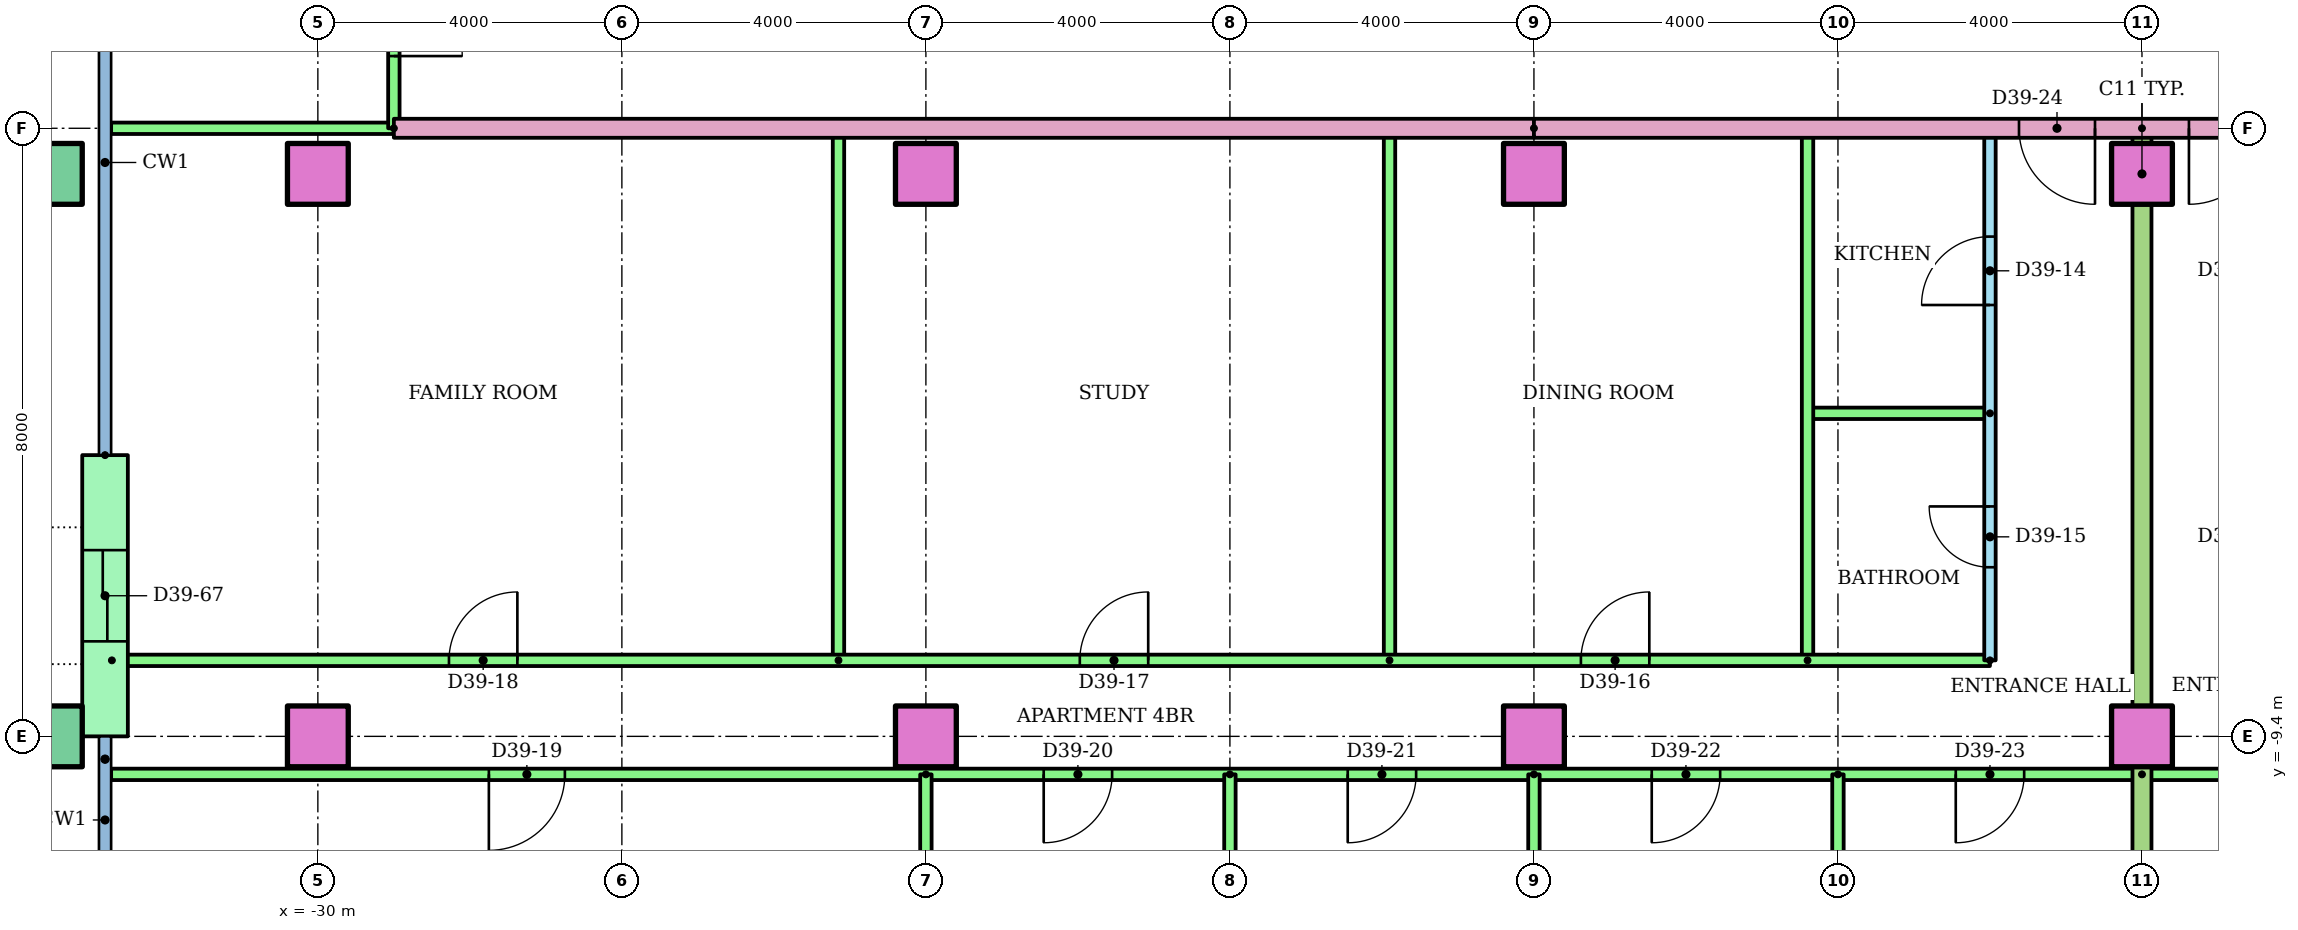
"""IFC4 building model, lengths in metres.
Left out: names, types, materials, properties, quantities, classifications, styles, units other than length and angle.
Written with IfcOpenShell. Run it as: python <this file> out.ifc"""

import sys

from ifc_helpers import new_model, si_unit, direction, frame, frame_2d, origin, origin_2d, place, context, subcontext, project, spatial, rectangle, hollow_rectangle, extrude, element, fill, save


model = new_model("IFC4")
c1 = context("Model", 3, precision=1e-05, world=origin(), true_north=direction((0.0, 1.0)))
c2 = subcontext(c1, "Body", "Model", "MODEL_VIEW")
j1 = project(units=[si_unit("LENGTHUNIT", "METRE"), si_unit("PLANEANGLEUNIT", "RADIAN")], contexts=[c1])
p1 = place(None, origin())
s1 = spatial("IfcSite", under=j1, at=p1, CompositionType="ELEMENT")
p2 = place(p1, origin())
s2 = spatial("IfcBuilding", under=s1, at=p2, CompositionType="ELEMENT")
p3 = place(p2, frame((0.0, 0.0, 148.6)))
s3 = spatial("IfcBuildingStorey", under=s2, at=p3, CompositionType="ELEMENT", Elevation=148.6)
p4 = place(p3, frame((-33.5, -9.4, 0.0)))
e1 = element("IfcColumn", 1, at=p4, inside=s3, PredefinedType="COLUMN", context=c2, shape_type="SweptSolid", body=[
    extrude(hollow_rectangle(XDim=0.8, YDim=0.8, WallThickness=0.04, at=origin_2d()), origin(), (0.0, 0.0, 1.0), 3.2),
])
for number, where in (
    (2, (-30.0, -9.4, 0.0)),
    (3, (-22.0, -9.4, 0.0)),
    (4, (-14.0, -9.4, 0.0)),
    (5, (-6.0, -9.4, 0.0)),
):
    element("IfcColumn", number, at=place(p3, frame(where)), inside=s3, PredefinedType="COLUMN", context=c2, shape_type="SweptSolid", body=[
        extrude(rectangle(XDim=0.8, YDim=0.8, at=origin_2d()), origin(), (0.0, 0.0, 1.0), 3.2),
    ])
p5 = place(p3, frame((-33.5, -2.0, 0.0)))
e6 = element("IfcColumn", 6, at=p5, inside=s3, PredefinedType="COLUMN", context=c2, shape_type="SweptSolid", body=[
    extrude(hollow_rectangle(XDim=0.8, YDim=0.8, WallThickness=0.04, at=origin_2d()), origin(), (0.0, 0.0, 1.0), 3.2),
])
for number, where in (
    (7, (-30.0, -2.0, 0.0)),
    (8, (-22.0, -2.0, 0.0)),
    (9, (-14.0, -2.0, 0.0)),
    (10, (-6.0, -2.0, 0.0)),
):
    element("IfcColumn", number, at=place(p3, frame(where)), inside=s3, PredefinedType="COLUMN", context=c2, shape_type="SweptSolid", body=[
        extrude(rectangle(XDim=0.8, YDim=0.8, at=origin_2d()), origin(), (0.0, 0.0, 1.0), 3.2),
    ])
p6 = place(p3, frame((-32.8, -5.7, 0.0), z_axis=(0.0, 0.0, 1.0), x_axis=(0.0, -1.0, 0.0)))
e11 = element("IfcWall", 11, at=p6, inside=s3, PredefinedType="STANDARD", context=c2, shape_type="SweptSolid", body=[
    extrude(rectangle(XDim=3.7, YDim=0.6, at=frame_2d((1.85, 0.0))), origin(), (0.0, 0.0, 1.0), 2.8),
])
p7 = place(p6, frame((1.25, 0.0, 0.0)))
e12 = element("IfcOpeningElement", 12, at=p7, cuts=e11, PredefinedType="OPENING", context=c2, shape_type="SweptSolid", body=[
    extrude(rectangle(XDim=1.2, YDim=2.1, at=frame_2d((0.6, 1.05))), frame((0.0, 0.31, 0.0), z_axis=(0.0, -1.0, 0.0), x_axis=(1.0, 0.0, 0.0)), (0.0, 0.0, 1.0), 0.62),
])
p8 = place(p3, frame((-8.0, -8.4, 0.0), z_axis=(0.0, 0.0, 1.0), x_axis=(0.0, 1.0, 0.0)))
e13 = element("IfcWall", 13, at=p8, inside=s3, PredefinedType="PARTITIONING", context=c2, shape_type="SweptSolid", body=[
    extrude(rectangle(XDim=7.0, YDim=0.15, at=frame_2d((3.5, 0.0))), origin(), (0.0, 0.0, 1.0), 2.4),
])
p9 = place(p8, frame((4.675, 0.0, 0.0)))
e14 = element("IfcOpeningElement", 14, at=p9, cuts=e13, PredefinedType="OPENING", context=c2, shape_type="SweptSolid", body=[
    extrude(rectangle(XDim=0.9, YDim=2.1, at=frame_2d((0.45, 1.05))), frame((0.0, 0.085, 0.0), z_axis=(0.0, -1.0, 0.0), x_axis=(1.0, 0.0, 0.0)), (0.0, 0.0, 1.0), 0.17),
])
p10 = place(p8, frame((1.225, 0.0, 0.0)))
e15 = element("IfcOpeningElement", 15, at=p10, cuts=e13, PredefinedType="OPENING", context=c2, shape_type="SweptSolid", body=[
    extrude(rectangle(XDim=0.8, YDim=2.1, at=frame_2d((0.4, 1.05))), frame((0.0, 0.085, 0.0), z_axis=(0.0, -1.0, 0.0), x_axis=(1.0, 0.0, 0.0)), (0.0, 0.0, 1.0), 0.17),
])
p11 = place(p3, frame((-8.0, -5.15, 0.0), z_axis=(0.0, 0.0, 1.0), x_axis=(-1.0, 0.0, 0.0)))
e16 = element("IfcWall", 16, at=p11, inside=s3, PredefinedType="PARTITIONING", context=c2, shape_type="SweptSolid", body=[
    extrude(rectangle(XDim=2.4, YDim=0.15, at=frame_2d((1.2, 0.0))), origin(), (0.0, 0.0, 1.0), 2.4),
])
for number, where, z_axis, x_axis in (
    (17, (-10.4, -8.4, 0.0), (0.0, 0.0, 1.0), (0.0, 1.0, 0.0)),
    (18, (-15.9, -8.4, 0.0), (0.0, 0.0, 1.0), (0.0, 1.0, 0.0)),
    (19, (-23.15, -8.4, 0.0), (0.0, 0.0, 1.0), (0.0, 1.0, 0.0)),
):
    element("IfcWall", number, at=place(p3, frame(where, z_axis=z_axis, x_axis=x_axis)), inside=s3, PredefinedType="PARTITIONING", context=c2, shape_type="SweptSolid", body=[
        extrude(rectangle(XDim=7.0, YDim=0.15, at=frame_2d((3.5, 0.0))), origin(), (0.0, 0.0, 1.0), 2.4),
    ])
p12 = place(p3, frame((-32.71, -8.4, 0.0)))
e20 = element("IfcWall", 20, at=p12, inside=s3, PredefinedType="PARTITIONING", context=c2, shape_type="SweptSolid", body=[
    extrude(rectangle(XDim=24.71, YDim=0.15, at=frame_2d((12.355, 0.0))), origin(), (0.0, 0.0, 1.0), 2.4),
])
p13 = place(p12, frame((19.328, 0.0, 0.0)))
e21 = element("IfcOpeningElement", 21, at=p13, cuts=e20, PredefinedType="OPENING", context=c2, shape_type="SweptSolid", body=[
    extrude(rectangle(XDim=0.9, YDim=2.1, at=frame_2d((0.45, 1.05))), frame((0.0, 0.085, 0.0), z_axis=(0.0, -1.0, 0.0), x_axis=(1.0, 0.0, 0.0)), (0.0, 0.0, 1.0), 0.17),
])
p14 = place(p12, frame((12.735, 0.0, 0.0)))
e22 = element("IfcOpeningElement", 22, at=p14, cuts=e20, PredefinedType="OPENING", context=c2, shape_type="SweptSolid", body=[
    extrude(rectangle(XDim=0.9, YDim=2.1, at=frame_2d((0.45, 1.05))), frame((0.0, 0.085, 0.0), z_axis=(0.0, -1.0, 0.0), x_axis=(1.0, 0.0, 0.0)), (0.0, 0.0, 1.0), 0.17),
])
p15 = place(p12, frame((4.435, 0.0, 0.0)))
e23 = element("IfcOpeningElement", 23, at=p15, cuts=e20, PredefinedType="OPENING", context=c2, shape_type="SweptSolid", body=[
    extrude(rectangle(XDim=0.9, YDim=2.1, at=frame_2d((0.45, 1.05))), frame((0.0, 0.085, 0.0), z_axis=(0.0, -1.0, 0.0), x_axis=(1.0, 0.0, 0.0)), (0.0, 0.0, 1.0), 0.17),
])
p16 = place(p3, frame((-6.0, -9.9, 0.0), z_axis=(0.0, 0.0, 1.0), x_axis=(-1.0, 0.0, 0.0)))
e24 = element("IfcWall", 24, at=p16, inside=s3, PredefinedType="PARTITIONING", context=c2, shape_type="SweptSolid", body=[
    extrude(rectangle(XDim=26.72, YDim=0.15, at=frame_2d((13.36, 0.0))), origin(), (0.0, 0.0, 1.0), 2.4),
])
p17 = place(p16, frame((20.75, 0.0, 0.0)))
e25 = element("IfcOpeningElement", 25, at=p17, cuts=e24, PredefinedType="OPENING", context=c2, shape_type="SweptSolid", body=[
    extrude(rectangle(XDim=1.0, YDim=2.1, at=frame_2d((0.5, 1.05))), frame((0.0, 0.085, 0.0), z_axis=(0.0, -1.0, 0.0), x_axis=(1.0, 0.0, 0.0)), (0.0, 0.0, 1.0), 0.17),
])
p18 = place(p16, frame((13.55, 0.0, 0.0)))
e26 = element("IfcOpeningElement", 26, at=p18, cuts=e24, PredefinedType="OPENING", context=c2, shape_type="SweptSolid", body=[
    extrude(rectangle(XDim=0.9, YDim=2.1, at=frame_2d((0.45, 1.05))), frame((0.0, 0.085, 0.0), z_axis=(0.0, -1.0, 0.0), x_axis=(1.0, 0.0, 0.0)), (0.0, 0.0, 1.0), 0.17),
])
p19 = place(p16, frame((9.55, 0.0, 0.0)))
e27 = element("IfcOpeningElement", 27, at=p19, cuts=e24, PredefinedType="OPENING", context=c2, shape_type="SweptSolid", body=[
    extrude(rectangle(XDim=0.9, YDim=2.1, at=frame_2d((0.45, 1.05))), frame((0.0, 0.085, 0.0), z_axis=(0.0, -1.0, 0.0), x_axis=(1.0, 0.0, 0.0)), (0.0, 0.0, 1.0), 0.17),
])
p20 = place(p16, frame((5.55, 0.0, 0.0)))
e28 = element("IfcOpeningElement", 28, at=p20, cuts=e24, PredefinedType="OPENING", context=c2, shape_type="SweptSolid", body=[
    extrude(rectangle(XDim=0.9, YDim=2.1, at=frame_2d((0.45, 1.05))), frame((0.0, 0.085, 0.0), z_axis=(0.0, -1.0, 0.0), x_axis=(1.0, 0.0, 0.0)), (0.0, 0.0, 1.0), 0.17),
])
p21 = place(p16, frame((1.55, 0.0, 0.0)))
e29 = element("IfcOpeningElement", 29, at=p21, cuts=e24, PredefinedType="OPENING", context=c2, shape_type="SweptSolid", body=[
    extrude(rectangle(XDim=0.9, YDim=2.1, at=frame_2d((0.45, 1.05))), frame((0.0, 0.085, 0.0), z_axis=(0.0, -1.0, 0.0), x_axis=(1.0, 0.0, 0.0)), (0.0, 0.0, 1.0), 0.17),
])
p22 = place(p3, frame((-22.0, -9.9, 0.0), z_axis=(0.0, 0.0, 1.0), x_axis=(0.0, -1.0, 0.0)))
e30 = element("IfcWall", 30, at=p22, inside=s3, PredefinedType="PARTITIONING", context=c2, shape_type="SweptSolid", body=[
    extrude(rectangle(XDim=6.41, YDim=0.15, at=frame_2d((3.205, 0.0))), origin(), (0.0, 0.0, 1.0), 2.4),
])
p23 = place(p3, frame((-18.0, -9.9, 0.0), z_axis=(0.0, 0.0, 1.0), x_axis=(0.0, -1.0, 0.0)))
e31 = element("IfcWall", 31, at=p23, inside=s3, PredefinedType="PARTITIONING", context=c2, shape_type="SweptSolid", body=[
    extrude(rectangle(XDim=6.421, YDim=0.15, at=frame_2d((3.21, 0.0))), origin(), (0.0, 0.0, 1.0), 2.4),
])
p24 = place(p3, frame((-14.0, -9.9, 0.0), z_axis=(0.0, 0.0, 1.0), x_axis=(0.0, -1.0, 0.0)))
e32 = element("IfcWall", 32, at=p24, inside=s3, PredefinedType="PARTITIONING", context=c2, shape_type="SweptSolid", body=[
    extrude(rectangle(XDim=6.41, YDim=0.15, at=frame_2d((3.205, 0.0))), origin(), (0.0, 0.0, 1.0), 2.4),
])
p25 = place(p3, frame((-10.0, -9.9, 0.0), z_axis=(0.0, 0.0, 1.0), x_axis=(0.0, -1.0, 0.0)))
e33 = element("IfcWall", 33, at=p25, inside=s3, PredefinedType="PARTITIONING", context=c2, shape_type="SweptSolid", body=[
    extrude(rectangle(XDim=6.421, YDim=0.15, at=frame_2d((3.21, 0.0))), origin(), (0.0, 0.0, 1.0), 2.4),
])
p26 = place(p3, frame((18.0, -9.9, 0.0), z_axis=(0.0, 0.0, 1.0), x_axis=(-1.0, 0.0, 0.0)))
e34 = element("IfcWall", 34, at=p26, inside=s3, PredefinedType="PARTITIONING", context=c2, shape_type="SweptSolid", body=[
    extrude(rectangle(XDim=24.0, YDim=0.15, at=frame_2d((12.0, 0.0))), origin(), (0.0, 0.0, 1.0), 2.4),
])
p27 = place(p26, frame((21.55, 0.0, 0.0)))
e35 = element("IfcOpeningElement", 35, at=p27, cuts=e34, PredefinedType="OPENING", context=c2, shape_type="SweptSolid", body=[
    extrude(rectangle(XDim=0.9, YDim=2.1, at=frame_2d((0.45, 1.05))), frame((0.0, 0.085, 0.0), z_axis=(0.0, -1.0, 0.0), x_axis=(1.0, 0.0, 0.0)), (0.0, 0.0, 1.0), 0.17),
])
p28 = place(p26, frame((17.55, 0.0, 0.0)))
e36 = element("IfcOpeningElement", 36, at=p28, cuts=e34, PredefinedType="OPENING", context=c2, shape_type="SweptSolid", body=[
    extrude(rectangle(XDim=0.9, YDim=2.1, at=frame_2d((0.45, 1.05))), frame((0.0, 0.085, 0.0), z_axis=(0.0, -1.0, 0.0), x_axis=(1.0, 0.0, 0.0)), (0.0, 0.0, 1.0), 0.17),
])
p29 = place(p26, frame((11.5, 0.0, 0.0)))
e37 = element("IfcOpeningElement", 37, at=p29, cuts=e34, PredefinedType="OPENING", context=c2, shape_type="SweptSolid", body=[
    extrude(rectangle(XDim=1.0, YDim=2.1, at=frame_2d((0.5, 1.05))), frame((0.0, 0.085, 0.0), z_axis=(0.0, -1.0, 0.0), x_axis=(1.0, 0.0, 0.0)), (0.0, 0.0, 1.0), 0.17),
])
p30 = place(p26, frame((5.55, 0.0, 0.0)))
e38 = element("IfcOpeningElement", 38, at=p30, cuts=e34, PredefinedType="OPENING", context=c2, shape_type="SweptSolid", body=[
    extrude(rectangle(XDim=0.9, YDim=2.1, at=frame_2d((0.45, 1.05))), frame((0.0, 0.085, 0.0), z_axis=(0.0, -1.0, 0.0), x_axis=(1.0, 0.0, 0.0)), (0.0, 0.0, 1.0), 0.17),
])
p31 = place(p26, frame((1.55, 0.0, 0.0)))
e39 = element("IfcOpeningElement", 39, at=p31, cuts=e34, PredefinedType="OPENING", context=c2, shape_type="SweptSolid", body=[
    extrude(rectangle(XDim=0.9, YDim=2.1, at=frame_2d((0.45, 1.05))), frame((0.0, 0.085, 0.0), z_axis=(0.0, -1.0, 0.0), x_axis=(1.0, 0.0, 0.0)), (0.0, 0.0, 1.0), 0.17),
])
p32 = place(p3, frame((-6.0, -1.4, 0.0), z_axis=(0.0, 0.0, 1.0), x_axis=(0.0, -1.0, 0.0)))
e40 = element("IfcWall", 40, at=p32, inside=s3, PredefinedType="PARTITIONING", context=c2, shape_type="SweptSolid", body=[
    extrude(rectangle(XDim=14.91, YDim=0.25, at=frame_2d((7.455, 0.0))), origin(), (0.0, 0.0, 1.0), 2.4),
])
p33 = place(p3, frame((-14.0, -1.4, 0.0), z_axis=(0.0, 0.0, 1.0), x_axis=(-1.0, 0.0, 0.0)))
e41 = element("IfcWall", 41, at=p33, inside=s3, PredefinedType="PARTITIONING", context=c2, shape_type="SweptSolid", body=[
    extrude(rectangle(XDim=15.0, YDim=0.25, at=frame_2d((7.5, 0.0))), origin(), (0.0, 0.0, 1.0), 2.4),
])
p34 = place(p3, frame((-29.0, -1.4, 0.0), z_axis=(0.0, 0.0, 1.0), x_axis=(-1.0, 0.0, 0.0)))
e42 = element("IfcWall", 42, at=p34, inside=s3, PredefinedType="PARTITIONING", context=c2, shape_type="SweptSolid", body=[
    extrude(rectangle(XDim=3.72, YDim=0.15, at=frame_2d((1.86, 0.0))), origin(), (0.0, 0.0, 1.0), 2.4),
])
p35 = place(p3, frame((-29.0, 1.4, 0.0), z_axis=(0.0, 0.0, 1.0), x_axis=(0.0, -1.0, 0.0)))
e43 = element("IfcWall", 43, at=p35, inside=s3, PredefinedType="PARTITIONING", context=c2, shape_type="SweptSolid", body=[
    extrude(rectangle(XDim=2.8, YDim=0.15, at=frame_2d((1.4, 0.0))), origin(), (0.0, 0.0, 1.0), 2.4),
])
p36 = place(p35, frame((0.95, 0.0, 0.0)))
e44 = element("IfcOpeningElement", 44, at=p36, cuts=e43, PredefinedType="OPENING", context=c2, shape_type="SweptSolid", body=[
    extrude(rectangle(XDim=0.9, YDim=2.1, at=frame_2d((0.45, 1.05))), frame((0.0, 0.085, 0.0), z_axis=(0.0, -1.0, 0.0), x_axis=(1.0, 0.0, 0.0)), (0.0, 0.0, 1.0), 0.17),
])
p37 = place(p3, frame((14.0, -1.4, 0.0), z_axis=(0.0, 0.0, 1.0), x_axis=(-1.0, 0.0, 0.0)))
e45 = element("IfcWall", 45, at=p37, inside=s3, PredefinedType="PARTITIONING", context=c2, shape_type="SweptSolid", body=[
    extrude(rectangle(XDim=28.0, YDim=0.25, at=frame_2d((14.0, 0.0))), origin(), (0.0, 0.0, 1.0), 2.4),
])
p38 = place(p37, frame((20.618, 0.0, 0.0)))
e46 = element("IfcOpeningElement", 46, at=p38, cuts=e45, PredefinedType="OPENING", context=c2, shape_type="SweptSolid", body=[
    extrude(rectangle(XDim=1.0, YDim=2.1, at=frame_2d((0.5, 1.05))), frame((0.0, 0.135, 0.0), z_axis=(0.0, -1.0, 0.0), x_axis=(1.0, 0.0, 0.0)), (0.0, 0.0, 1.0), 0.27),
])
p39 = place(p37, frame((18.382, 0.0, 0.0)))
e47 = element("IfcOpeningElement", 47, at=p39, cuts=e45, PredefinedType="OPENING", context=c2, shape_type="SweptSolid", body=[
    extrude(rectangle(XDim=1.0, YDim=2.1, at=frame_2d((0.5, 1.05))), frame((0.0, 0.135, 0.0), z_axis=(0.0, -1.0, 0.0), x_axis=(1.0, 0.0, 0.0)), (0.0, 0.0, 1.0), 0.27),
])
p40 = place(p9, origin())
e48 = element("IfcDoor", 48, at=p40, inside=s3, OperationType="SINGLE_SWING_LEFT", PredefinedType="DOOR", context=c2, shape_type="SweptSolid", body=[
    extrude(rectangle(XDim=0.9, YDim=2.1, at=frame_2d((0.45, 1.05))), frame((0.0, 0.025, 0.0), z_axis=(0.0, -1.0, 0.0), x_axis=(1.0, 0.0, 0.0)), (0.0, 0.0, 1.0), 0.05),
])
fill(e14, e48)
p41 = place(p10, origin())
e49 = element("IfcDoor", 49, at=p41, inside=s3, OperationType="SINGLE_SWING_RIGHT", PredefinedType="DOOR", context=c2, shape_type="SweptSolid", body=[
    extrude(rectangle(XDim=0.8, YDim=2.1, at=frame_2d((0.4, 1.05))), frame((0.0, 0.025, 0.0), z_axis=(0.0, -1.0, 0.0), x_axis=(1.0, 0.0, 0.0)), (0.0, 0.0, 1.0), 0.05),
])
fill(e15, e49)
p42 = place(p13, origin())
e50 = element("IfcDoor", 50, at=p42, inside=s3, OperationType="SINGLE_SWING_RIGHT", PredefinedType="DOOR", context=c2, shape_type="SweptSolid", body=[
    extrude(rectangle(XDim=0.9, YDim=2.1, at=frame_2d((0.45, 1.05))), frame((0.0, 0.025, 0.0), z_axis=(0.0, -1.0, 0.0), x_axis=(1.0, 0.0, 0.0)), (0.0, 0.0, 1.0), 0.05),
])
fill(e21, e50)
p43 = place(p14, origin())
e51 = element("IfcDoor", 51, at=p43, inside=s3, OperationType="SINGLE_SWING_RIGHT", PredefinedType="DOOR", context=c2, shape_type="SweptSolid", body=[
    extrude(rectangle(XDim=0.9, YDim=2.1, at=frame_2d((0.45, 1.05))), frame((0.0, 0.025, 0.0), z_axis=(0.0, -1.0, 0.0), x_axis=(1.0, 0.0, 0.0)), (0.0, 0.0, 1.0), 0.05),
])
fill(e22, e51)
p44 = place(p15, origin())
e52 = element("IfcDoor", 52, at=p44, inside=s3, OperationType="SINGLE_SWING_RIGHT", PredefinedType="DOOR", context=c2, shape_type="SweptSolid", body=[
    extrude(rectangle(XDim=0.9, YDim=2.1, at=frame_2d((0.45, 1.05))), frame((0.0, 0.025, 0.0), z_axis=(0.0, -1.0, 0.0), x_axis=(1.0, 0.0, 0.0)), (0.0, 0.0, 1.0), 0.05),
])
fill(e23, e52)
p45 = place(p17, origin())
e53 = element("IfcDoor", 53, at=p45, inside=s3, OperationType="SINGLE_SWING_RIGHT", PredefinedType="DOOR", context=c2, shape_type="SweptSolid", body=[
    extrude(rectangle(XDim=1.0, YDim=2.1, at=frame_2d((0.5, 1.05))), frame((0.0, 0.025, 0.0), z_axis=(0.0, -1.0, 0.0), x_axis=(1.0, 0.0, 0.0)), (0.0, 0.0, 1.0), 0.05),
])
fill(e25, e53)
p46 = place(p18, origin())
e54 = element("IfcDoor", 54, at=p46, inside=s3, OperationType="SINGLE_SWING_RIGHT", PredefinedType="DOOR", context=c2, shape_type="SweptSolid", body=[
    extrude(rectangle(XDim=0.9, YDim=2.1, at=frame_2d((0.45, 1.05))), frame((0.0, 0.025, 0.0), z_axis=(0.0, -1.0, 0.0), x_axis=(1.0, 0.0, 0.0)), (0.0, 0.0, 1.0), 0.05),
])
fill(e26, e54)
p47 = place(p19, origin())
e55 = element("IfcDoor", 55, at=p47, inside=s3, OperationType="SINGLE_SWING_RIGHT", PredefinedType="DOOR", context=c2, shape_type="SweptSolid", body=[
    extrude(rectangle(XDim=0.9, YDim=2.1, at=frame_2d((0.45, 1.05))), frame((0.0, 0.025, 0.0), z_axis=(0.0, -1.0, 0.0), x_axis=(1.0, 0.0, 0.0)), (0.0, 0.0, 1.0), 0.05),
])
fill(e27, e55)
p48 = place(p20, origin())
e56 = element("IfcDoor", 56, at=p48, inside=s3, OperationType="SINGLE_SWING_RIGHT", PredefinedType="DOOR", context=c2, shape_type="SweptSolid", body=[
    extrude(rectangle(XDim=0.9, YDim=2.1, at=frame_2d((0.45, 1.05))), frame((0.0, 0.025, 0.0), z_axis=(0.0, -1.0, 0.0), x_axis=(1.0, 0.0, 0.0)), (0.0, 0.0, 1.0), 0.05),
])
fill(e28, e56)
p49 = place(p21, origin())
e57 = element("IfcDoor", 57, at=p49, inside=s3, OperationType="SINGLE_SWING_RIGHT", PredefinedType="DOOR", context=c2, shape_type="SweptSolid", body=[
    extrude(rectangle(XDim=0.9, YDim=2.1, at=frame_2d((0.45, 1.05))), frame((0.0, 0.025, 0.0), z_axis=(0.0, -1.0, 0.0), x_axis=(1.0, 0.0, 0.0)), (0.0, 0.0, 1.0), 0.05),
])
fill(e29, e57)
p50 = place(p38, origin())
e58 = element("IfcDoor", 58, at=p50, inside=s3, OperationType="SINGLE_SWING_LEFT", PredefinedType="DOOR", context=c2, shape_type="SweptSolid", body=[
    extrude(rectangle(XDim=1.0, YDim=2.1, at=frame_2d((0.5, 1.05))), frame((0.0, 0.025, 0.0), z_axis=(0.0, -1.0, 0.0), x_axis=(1.0, 0.0, 0.0)), (0.0, 0.0, 1.0), 0.05),
])
fill(e46, e58)
p51 = place(p39, origin())
e59 = element("IfcDoor", 59, at=p51, inside=s3, OperationType="SINGLE_SWING_RIGHT", PredefinedType="DOOR", context=c2, shape_type="SweptSolid", body=[
    extrude(rectangle(XDim=1.0, YDim=2.1, at=frame_2d((0.5, 1.05))), frame((0.0, 0.025, 0.0), z_axis=(0.0, -1.0, 0.0), x_axis=(1.0, 0.0, 0.0)), (0.0, 0.0, 1.0), 0.05),
])
fill(e47, e59)
p52 = place(p36, origin())
e60 = element("IfcDoor", 60, at=p52, inside=s3, OperationType="SINGLE_SWING_RIGHT", PredefinedType="DOOR", context=c2, shape_type="SweptSolid", body=[
    extrude(rectangle(XDim=0.9, YDim=2.1, at=frame_2d((0.45, 1.05))), frame((0.0, 0.025, 0.0), z_axis=(0.0, -1.0, 0.0), x_axis=(1.0, 0.0, 0.0)), (0.0, 0.0, 1.0), 0.05),
])
fill(e44, e60)
p53 = place(p7, origin())
e61 = element("IfcDoor", 61, at=p53, inside=s3, OperationType="SLIDING_TO_LEFT", PredefinedType="DOOR", context=c2, shape_type="SweptSolid", body=[
    extrude(rectangle(XDim=1.2, YDim=2.1, at=frame_2d((0.6, 1.05))), frame((0.0, 0.025, 0.0), z_axis=(0.0, -1.0, 0.0), x_axis=(1.0, 0.0, 0.0)), (0.0, 0.0, 1.0), 0.05),
])
fill(e12, e61)
save(model, sys.argv[1])
